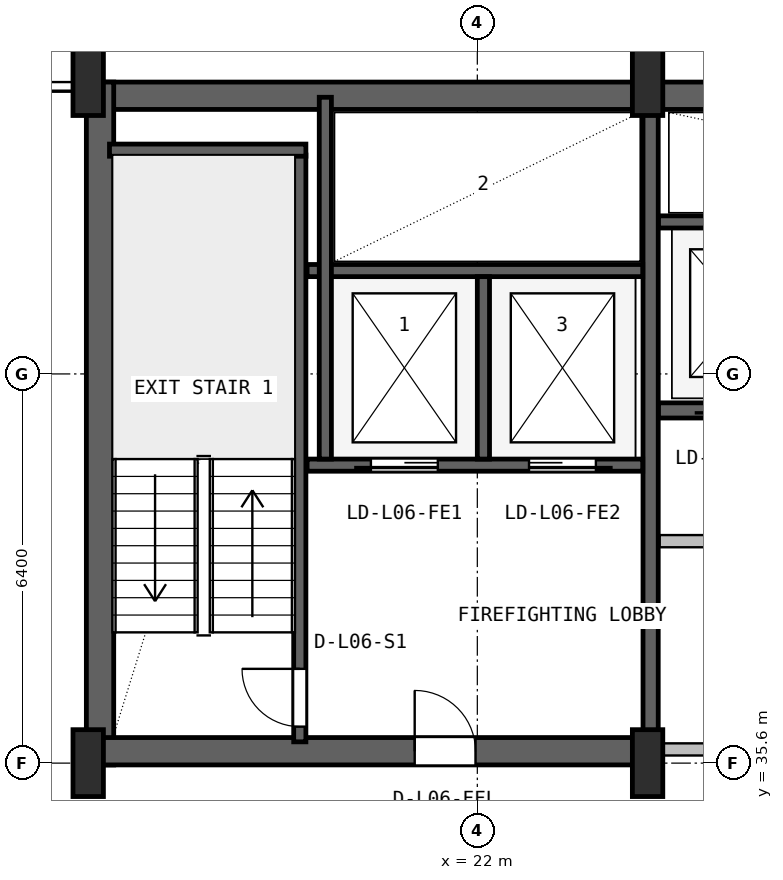
"""IFC4 building model, lengths in metres.
Left out: names, types, materials, properties, quantities, classifications, styles, units other than length and angle.
Written with IfcOpenShell. Run it as: python <this file> out.ifc"""

import sys

from ifc_helpers import new_model, si_unit, direction, frame, frame_2d, origin, origin_2d, place, context, subcontext, project, spatial, rectangle, i_section, extrude, source, transform, mapped, element, fill, save


model = new_model("IFC4")
c1 = context("Model", 3, precision=1e-05, world=origin(), true_north=direction((0.0, 1.0)))
c2 = subcontext(c1, "Body", "Model", "MODEL_VIEW")
j1 = project(units=[si_unit("LENGTHUNIT", "METRE"), si_unit("PLANEANGLEUNIT", "RADIAN")], contexts=[c1])
p1 = place(None, origin())
s1 = spatial("IfcSite", under=j1, at=p1, CompositionType="ELEMENT")
p2 = place(p1, origin())
s2 = spatial("IfcBuilding", under=s1, at=p2, CompositionType="ELEMENT")
p3 = place(p2, frame((0.0, 0.0, 31.5)))
s3 = spatial("IfcBuildingStorey", under=s2, at=p3, CompositionType="ELEMENT", Elevation=31.5)
p4 = place(p3, frame((15.6, 46.575, 0.0), z_axis=(0.0, 0.0, 1.0), x_axis=(1.0, 0.0, 0.0)))
e1 = element("IfcWall", 1, at=p4, inside=s3, PredefinedType="SHEAR", context=c2, shape_type="SweptSolid", body=[
    extrude(rectangle(XDim=36.8, YDim=0.45, at=frame_2d((18.4, 0.0))), origin(), (0.0, 0.0, 1.0), 3.65),
])
p5 = place(p3, frame((15.795, 35.57, 0.0), z_axis=(0.0, 0.0, 1.0), x_axis=(0.0, 1.0, 0.0)))
e2 = element("IfcWall", 2, at=p5, inside=s3, PredefinedType="SHEAR", context=c2, shape_type="SweptSolid", body=[
    extrude(rectangle(XDim=11.23, YDim=0.45, at=frame_2d((5.615, 0.0))), origin(), (0.0, 0.0, 1.0), 3.65),
])
p6 = place(p3, frame((15.57, 35.795, 0.0), z_axis=(0.0, 0.0, 1.0), x_axis=(1.0, 0.0, 0.0)))
e3 = element("IfcWall", 3, at=p6, inside=s3, PredefinedType="SHEAR", context=c2, shape_type="SweptSolid", body=[
    extrude(rectangle(XDim=9.23, YDim=0.45, at=frame_2d((4.615, 0.0))), origin(), (0.0, 0.0, 1.0), 3.65),
])
p7 = place(p6, frame((5.4, 0.0, 0.0)))
e4 = element("IfcOpeningElement", 4, at=p7, cuts=e3, PredefinedType="OPENING", context=c2, shape_type="SweptSolid", body=[
    extrude(rectangle(XDim=1.0, YDim=2.1, at=frame_2d((0.5, 1.05))), frame((0.0, 0.235, 0.0), z_axis=(0.0, -1.0, 0.0), x_axis=(1.0, 0.0, 0.0)), (0.0, 0.0, 1.0), 0.47),
])
m1 = source(origin(), c2, "Body", "SweptSolid", [
    extrude(i_section(OverallWidth=0.5, OverallDepth=1.1, WebThickness=0.018, FlangeThickness=0.032, FilletRadius=0.018, at=origin_2d()), origin(), (0.0, 0.0, 1.0), 3.9),
])
for number, where, z_axis, x_axis in (
    (5, (15.6, 35.6, 0.0), (0.0, 0.0, 1.0), (1.0, 0.0, 0.0)),
    (6, (15.6, 46.8, 0.0), (0.0, 0.0, 1.0), (1.0, 0.0, 0.0)),
    (7, (24.8, 35.6, 0.0), (0.0, 0.0, 1.0), (1.0, 0.0, 0.0)),
    (8, (24.8, 46.8, 0.0), (0.0, 0.0, 1.0), (1.0, 0.0, 0.0)),
):
    element("IfcColumn", number, at=place(p3, frame(where, z_axis=z_axis, x_axis=x_axis)), inside=s3, PredefinedType="COLUMN", context=c2, shape_type="MappedRepresentation", body=[
        mapped(m1, transform((0.0, 0.0, 0.0), x_axis=(1.0, 0.0, 0.0), y_axis=(0.0, 1.0, 0.0), z_axis=(0.0, 0.0, 1.0), scale=1.0)),
    ])
p8 = place(p3, frame((19.08, 35.95, 0.0), z_axis=(0.0, 0.0, 1.0), x_axis=(0.0, 1.0, 0.0)))
e9 = element("IfcWall", 9, at=p8, inside=s3, PredefinedType="SHEAR", context=c2, shape_type="SweptSolid", body=[
    extrude(rectangle(XDim=9.65, YDim=0.2, at=frame_2d((4.825, 0.0))), origin(), (0.0, 0.0, 1.0), 3.65),
])
p9 = place(p8, frame((0.25, 0.0, 0.0)))
e10 = element("IfcOpeningElement", 10, at=p9, cuts=e9, PredefinedType="OPENING", context=c2, shape_type="SweptSolid", body=[
    extrude(rectangle(XDim=0.95, YDim=2.1, at=frame_2d((0.475, 1.05))), frame((0.0, 0.11, 0.0), z_axis=(0.0, -1.0, 0.0), x_axis=(1.0, 0.0, 0.0)), (0.0, 0.0, 1.0), 0.22),
])
p10 = place(p3, frame((15.95, 45.68, 0.0), z_axis=(0.0, 0.0, 1.0), x_axis=(1.0, 0.0, 0.0)))
e11 = element("IfcWall", 11, at=p10, inside=s3, PredefinedType="SHEAR", context=c2, shape_type="SweptSolid", body=[
    extrude(rectangle(XDim=3.23, YDim=0.2, at=frame_2d((1.615, 0.0))), origin(), (0.0, 0.0, 1.0), 3.65),
])
p11 = place(p3, frame((24.85, 36.05, 0.0), z_axis=(0.0, 0.0, 1.0), x_axis=(0.0, 1.0, 0.0)))
e12 = element("IfcWall", 12, at=p11, inside=s3, PredefinedType="SHEAR", context=c2, shape_type="SweptSolid", body=[
    extrude(rectangle(XDim=10.45, YDim=0.25, at=frame_2d((5.225, 0.0))), origin(), (0.0, 0.0, 1.0), 3.65),
])
p12 = place(p3, frame((19.2, 40.5, 0.0), z_axis=(0.0, 0.0, 1.0), x_axis=(1.0, 0.0, 0.0)))
e13 = element("IfcWall", 13, at=p12, inside=s3, PredefinedType="SHEAR", context=c2, shape_type="SweptSolid", body=[
    extrude(rectangle(XDim=5.52, YDim=0.2, at=frame_2d((2.76, 0.0))), origin(), (0.0, 0.0, 1.0), 3.65),
])
p13 = place(p12, frame((1.05, 0.0, 0.0)))
e14 = element("IfcOpeningElement", 14, at=p13, cuts=e13, PredefinedType="OPENING", context=c2, shape_type="SweptSolid", body=[
    extrude(rectangle(XDim=1.1, YDim=2.18, at=frame_2d((0.55, 1.09))), frame((0.0, 0.11, 0.0), z_axis=(0.0, -1.0, 0.0), x_axis=(1.0, 0.0, 0.0)), (0.0, 0.0, 1.0), 0.22),
])
p14 = place(p12, frame((3.65, 0.0, 0.0)))
e15 = element("IfcOpeningElement", 15, at=p14, cuts=e13, PredefinedType="OPENING", context=c2, shape_type="SweptSolid", body=[
    extrude(rectangle(XDim=1.1, YDim=2.18, at=frame_2d((0.55, 1.09))), frame((0.0, 0.11, 0.0), z_axis=(0.0, -1.0, 0.0), x_axis=(1.0, 0.0, 0.0)), (0.0, 0.0, 1.0), 0.22),
])
p15 = place(p3, frame((19.2, 43.7, 0.0), z_axis=(0.0, 0.0, 1.0), x_axis=(1.0, 0.0, 0.0)))
e16 = element("IfcWall", 16, at=p15, inside=s3, PredefinedType="SHEAR", context=c2, shape_type="SweptSolid", body=[
    extrude(rectangle(XDim=5.52, YDim=0.2, at=frame_2d((2.76, 0.0))), origin(), (0.0, 0.0, 1.0), 3.65),
])
p16 = place(p3, frame((22.1, 40.6, 0.0), z_axis=(0.0, 0.0, 1.0), x_axis=(0.0, 1.0, 0.0)))
e17 = element("IfcWall", 17, at=p16, inside=s3, PredefinedType="SHEAR", context=c2, shape_type="SweptSolid", body=[
    extrude(rectangle(XDim=3.0, YDim=0.2, at=frame_2d((1.5, 0.0))), origin(), (0.0, 0.0, 1.0), 3.65),
])
p17 = place(p3, frame((19.5, 40.6, 0.0), z_axis=(0.0, 0.0, 1.0), x_axis=(0.0, 1.0, 0.0)))
e18 = element("IfcWall", 18, at=p17, inside=s3, PredefinedType="SHEAR", context=c2, shape_type="SweptSolid", body=[
    extrude(rectangle(XDim=5.95, YDim=0.2, at=frame_2d((2.975, 0.0))), origin(), (0.0, 0.0, 1.0), 3.65),
])
p18 = place(p3, frame((24.98, 41.4, 0.0), z_axis=(0.0, 0.0, 1.0), x_axis=(1.0, 0.0, 0.0)))
e19 = element("IfcWall", 19, at=p18, inside=s3, PredefinedType="SHEAR", context=c2, shape_type="SweptSolid", body=[
    extrude(rectangle(XDim=23.82, YDim=0.25, at=frame_2d((11.91, 0.0))), origin(), (0.0, 0.0, 1.0), 3.65),
])
p19 = place(p18, frame((0.87, 0.0, 0.0)))
e20 = element("IfcOpeningElement", 20, at=p19, cuts=e19, PredefinedType="OPENING", context=c2, shape_type="SweptSolid", body=[
    extrude(rectangle(XDim=1.1, YDim=2.18, at=frame_2d((0.55, 1.09))), frame((0.0, 0.135, 0.0), z_axis=(0.0, -1.0, 0.0), x_axis=(1.0, 0.0, 0.0)), (0.0, 0.0, 1.0), 0.27),
])
p20 = place(p18, frame((3.47, 0.0, 0.0)))
e21 = element("IfcOpeningElement", 21, at=p20, cuts=e19, PredefinedType="OPENING", context=c2, shape_type="SweptSolid", body=[
    extrude(rectangle(XDim=1.1, YDim=2.18, at=frame_2d((0.55, 1.09))), frame((0.0, 0.135, 0.0), z_axis=(0.0, -1.0, 0.0), x_axis=(1.0, 0.0, 0.0)), (0.0, 0.0, 1.0), 0.27),
])
p21 = place(p18, frame((6.07, 0.0, 0.0)))
e22 = element("IfcOpeningElement", 22, at=p21, cuts=e19, PredefinedType="OPENING", context=c2, shape_type="SweptSolid", body=[
    extrude(rectangle(XDim=1.1, YDim=2.18, at=frame_2d((0.55, 1.09))), frame((0.0, 0.135, 0.0), z_axis=(0.0, -1.0, 0.0), x_axis=(1.0, 0.0, 0.0)), (0.0, 0.0, 1.0), 0.27),
])
p22 = place(p3, frame((24.98, 44.5, 0.0), z_axis=(0.0, 0.0, 1.0), x_axis=(1.0, 0.0, 0.0)))
e23 = element("IfcWall", 23, at=p22, inside=s3, PredefinedType="SHEAR", context=c2, shape_type="SweptSolid", body=[
    extrude(rectangle(XDim=7.87, YDim=0.2, at=frame_2d((3.935, 0.0))), origin(), (0.0, 0.0, 1.0), 3.65),
])
p23 = place(p3, frame((25.0, 35.825, 0.0), z_axis=(0.0, 0.0, 1.0), x_axis=(1.0, 0.0, 0.0)))
e24 = element("IfcWall", 24, at=p23, inside=s3, PredefinedType="PLUMBINGWALL", context=c2, shape_type="SweptSolid", body=[
    extrude(rectangle(XDim=9.75, YDim=0.2, at=frame_2d((4.875, 0.0))), origin(), (0.0, 0.0, 1.0), 2.425),
])
p24 = place(p3, frame((25.0, 39.25, 0.0), z_axis=(0.0, 0.0, 1.0), x_axis=(1.0, 0.0, 0.0)))
e25 = element("IfcWall", 25, at=p24, inside=s3, PredefinedType="PLUMBINGWALL", context=c2, shape_type="SweptSolid", body=[
    extrude(rectangle(XDim=9.75, YDim=0.2, at=frame_2d((4.875, 0.0))), origin(), (0.0, 0.0, 1.0), 3.63),
])
p25 = place(p24, frame((1.75, 0.0, 0.0)))
e26 = element("IfcOpeningElement", 26, at=p25, cuts=e25, PredefinedType="OPENING", context=c2, shape_type="SweptSolid", body=[
    extrude(rectangle(XDim=0.9, YDim=2.06, at=frame_2d((0.45, 1.03))), frame((0.0, 0.11, 0.0), z_axis=(0.0, -1.0, 0.0), x_axis=(1.0, 0.0, 0.0)), (0.0, 0.0, 1.0), 0.22),
])
p26 = place(p24, frame((6.725, 0.0, 0.0)))
e27 = element("IfcOpeningElement", 27, at=p26, cuts=e25, PredefinedType="OPENING", context=c2, shape_type="SweptSolid", body=[
    extrude(rectangle(XDim=0.9, YDim=2.06, at=frame_2d((0.45, 1.03))), frame((0.0, 0.11, 0.0), z_axis=(0.0, -1.0, 0.0), x_axis=(1.0, 0.0, 0.0)), (0.0, 0.0, 1.0), 0.22),
])
m2 = source(origin(), c2, "Body", "SweptSolid", [
    extrude(rectangle(XDim=0.95, YDim=2.1, at=frame_2d((0.475, 1.05))), frame((0.0, 0.025, 0.0), z_axis=(0.0, -1.0, 0.0), x_axis=(1.0, 0.0, 0.0)), (0.0, 0.0, 1.0), 0.05),
])
p27 = place(p9, origin())
e28 = element("IfcDoor", 28, at=p27, inside=s3, OperationType="SINGLE_SWING_RIGHT", PredefinedType="DOOR", context=c2, shape_type="MappedRepresentation", body=[
    mapped(m2, transform((0.0, 0.0, 0.0), x_axis=(1.0, 0.0, 0.0), y_axis=(0.0, 1.0, 0.0), z_axis=(0.0, 0.0, 1.0), scale=1.0)),
])
fill(e10, e28)
m3 = source(origin(), c2, "Body", "SweptSolid", [
    extrude(rectangle(XDim=1.0, YDim=2.1, at=frame_2d((0.5, 1.05))), frame((0.0, 0.025, 0.0), z_axis=(0.0, -1.0, 0.0), x_axis=(1.0, 0.0, 0.0)), (0.0, 0.0, 1.0), 0.05),
])
p28 = place(p7, origin())
e29 = element("IfcDoor", 29, at=p28, inside=s3, OperationType="SINGLE_SWING_LEFT", PredefinedType="DOOR", context=c2, shape_type="MappedRepresentation", body=[
    mapped(m3, transform((0.0, 0.0, 0.0), x_axis=(1.0, 0.0, 0.0), y_axis=(0.0, 1.0, 0.0), z_axis=(0.0, 0.0, 1.0), scale=1.0)),
])
fill(e4, e29)
m4 = source(origin(), c2, "Body", "SweptSolid", [
    extrude(rectangle(XDim=1.1, YDim=2.18, at=frame_2d((0.55, 1.09))), frame((0.0, 0.025, 0.0), z_axis=(0.0, -1.0, 0.0), x_axis=(1.0, 0.0, 0.0)), (0.0, 0.0, 1.0), 0.05),
])
p29 = place(p13, frame((1.1, 0.0, 0.0), z_axis=(0.0, 0.0, 1.0), x_axis=(-1.0, 0.0, 0.0)))
e30 = element("IfcDoor", 30, at=p29, inside=s3, OperationType="SLIDING_TO_LEFT", PredefinedType="DOOR", context=c2, shape_type="MappedRepresentation", body=[
    mapped(m4, transform((0.0, 0.0, 0.0), x_axis=(1.0, 0.0, 0.0), y_axis=(0.0, 1.0, 0.0), z_axis=(0.0, 0.0, 1.0), scale=1.0)),
])
fill(e14, e30)
p30 = place(p14, frame((1.1, 0.0, 0.0), z_axis=(0.0, 0.0, 1.0), x_axis=(-1.0, 0.0, 0.0)))
e31 = element("IfcDoor", 31, at=p30, inside=s3, OperationType="SLIDING_TO_RIGHT", PredefinedType="DOOR", context=c2, shape_type="MappedRepresentation", body=[
    mapped(m4, transform((0.0, 0.0, 0.0), x_axis=(1.0, 0.0, 0.0), y_axis=(0.0, 1.0, 0.0), z_axis=(0.0, 0.0, 1.0), scale=1.0)),
])
fill(e15, e31)
save(model, sys.argv[1])
